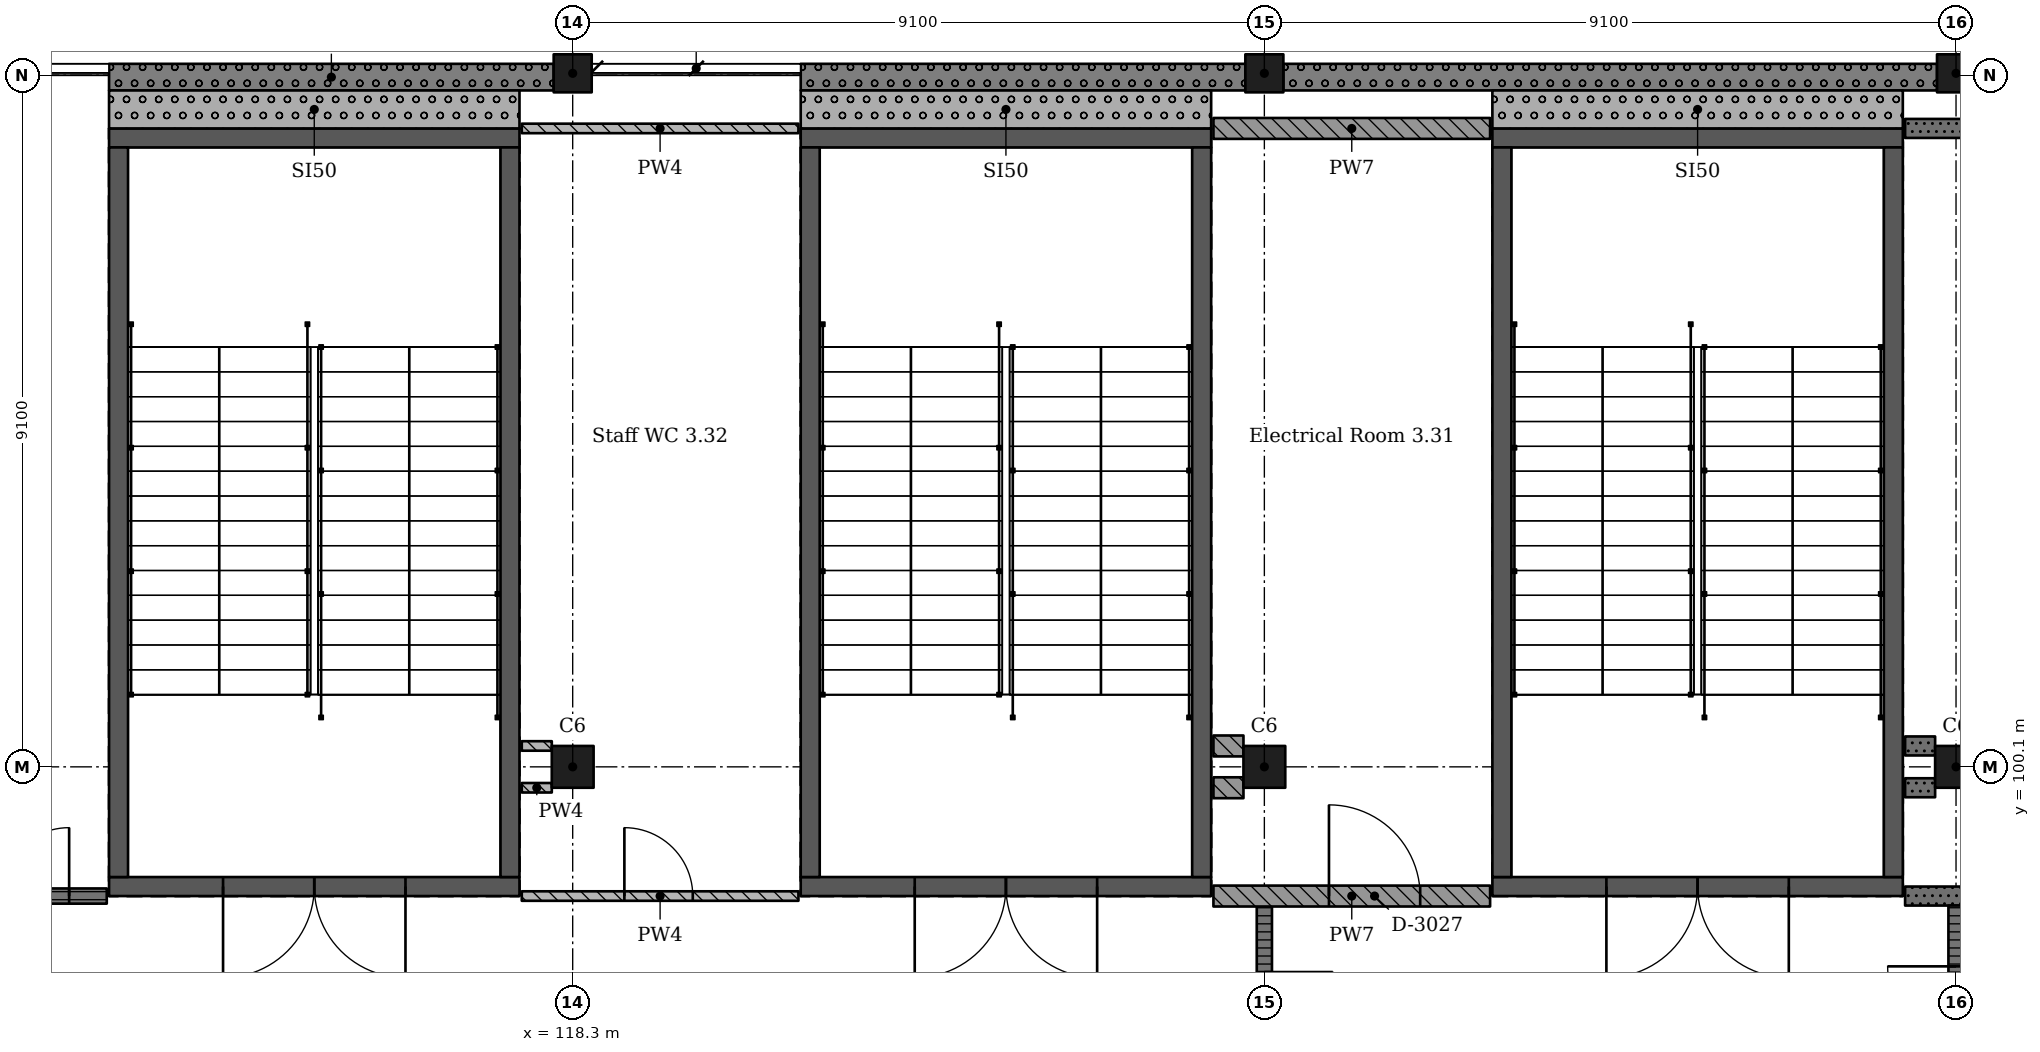
"""IFC4 building model, lengths in metres.
Left out: names, types, materials, properties, quantities, classifications, styles, units other than length and angle.
Written with IfcOpenShell. Run it as: python <this file> out.ifc"""

import sys

from ifc_helpers import new_model, si_unit, direction, frame, frame_2d, origin, origin_2d, place, context, subcontext, project, spatial, rectangle, extrude, element, fill, save


model = new_model("IFC4")
c1 = context("Model", 3, precision=1e-05, world=origin(), true_north=direction((0.0, 1.0)))
c2 = subcontext(c1, "Body", "Model", "MODEL_VIEW")
j1 = project(units=[si_unit("LENGTHUNIT", "METRE"), si_unit("PLANEANGLEUNIT", "RADIAN")], contexts=[c1])
p1 = place(None, origin())
s1 = spatial("IfcSite", under=j1, at=p1, CompositionType="ELEMENT")
p2 = place(p1, origin())
s2 = spatial("IfcBuilding", under=s1, at=p2, CompositionType="ELEMENT")
p3 = place(p2, frame((0.0, 0.0, 15.47)))
s3 = spatial("IfcBuildingStorey", under=s2, at=p3, CompositionType="ELEMENT", Elevation=15.47)
p4 = place(p3, frame((118.3, 100.1, 0.0), z_axis=(0.0, 0.0, 1.0), x_axis=(1.0, 0.0, 0.0)))
e1 = element("IfcColumn", 1, at=p4, inside=s3, PredefinedType="COLUMN", context=c2, shape_type="SweptSolid", body=[
    extrude(rectangle(XDim=0.55, YDim=0.55, at=origin_2d()), origin(), (0.0, 0.0, 1.0), 4.55),
])
p5 = place(p3, frame((118.3, 109.225, 0.0), z_axis=(0.0, 0.0, 1.0), x_axis=(1.0, 0.0, 0.0)))
e2 = element("IfcColumn", 2, at=p5, inside=s3, PredefinedType="COLUMN", context=c2, shape_type="SweptSolid", body=[
    extrude(rectangle(XDim=0.5, YDim=0.5, at=origin_2d()), origin(), (0.0, 0.0, 1.0), 4.55),
])
p6 = place(p3, frame((127.4, 100.1, 0.0), z_axis=(0.0, 0.0, 1.0), x_axis=(1.0, 0.0, 0.0)))
e3 = element("IfcColumn", 3, at=p6, inside=s3, PredefinedType="COLUMN", context=c2, shape_type="SweptSolid", body=[
    extrude(rectangle(XDim=0.55, YDim=0.55, at=origin_2d()), origin(), (0.0, 0.0, 1.0), 4.55),
])
p7 = place(p3, frame((127.4, 109.225, 0.0), z_axis=(0.0, 0.0, 1.0), x_axis=(1.0, 0.0, 0.0)))
e4 = element("IfcColumn", 4, at=p7, inside=s3, PredefinedType="COLUMN", context=c2, shape_type="SweptSolid", body=[
    extrude(rectangle(XDim=0.5, YDim=0.5, at=origin_2d()), origin(), (0.0, 0.0, 1.0), 4.55),
])
p8 = place(p3, frame((136.5, 100.1, 0.0), z_axis=(0.0, 0.0, 1.0), x_axis=(1.0, 0.0, 0.0)))
e5 = element("IfcColumn", 5, at=p8, inside=s3, PredefinedType="COLUMN", context=c2, shape_type="SweptSolid", body=[
    extrude(rectangle(XDim=0.55, YDim=0.55, at=origin_2d()), origin(), (0.0, 0.0, 1.0), 4.55),
])
p9 = place(p3, frame((136.5, 109.225, 0.0), z_axis=(0.0, 0.0, 1.0), x_axis=(1.0, 0.0, 0.0)))
e6 = element("IfcColumn", 6, at=p9, inside=s3, PredefinedType="COLUMN", context=c2, shape_type="SweptSolid", body=[
    extrude(rectangle(XDim=0.5, YDim=0.5, at=origin_2d()), origin(), (0.0, 0.0, 1.0), 4.55),
])
p10 = place(p3, frame((135.8, 98.525, 0.0), z_axis=(0.0, 0.0, 1.0), x_axis=(-1.0, 0.0, 0.0)))
e7 = element("IfcWall", 7, at=p10, inside=s3, PredefinedType="SHEAR", context=c2, shape_type="SweptSolid", body=[
    extrude(rectangle(XDim=5.4, YDim=0.25, at=frame_2d((2.7, 0.0))), origin(), (0.0, 0.0, 1.0), 4.55),
])
p11 = place(p10, frame((1.5, 0.0, 0.0)))
e8 = element("IfcOpeningElement", 8, at=p11, cuts=e7, PredefinedType="OPENING", context=c2, shape_type="SweptSolid", body=[
    extrude(rectangle(XDim=2.4, YDim=2.1, at=frame_2d((1.2, 1.05))), frame((0.0, 0.135, 0.0), z_axis=(0.0, -1.0, 0.0), x_axis=(1.0, 0.0, 0.0)), (0.0, 0.0, 1.0), 0.27),
])
p12 = place(p3, frame((135.8, 108.375, 0.0), z_axis=(0.0, 0.0, 1.0), x_axis=(-1.0, 0.0, 0.0)))
e9 = element("IfcWall", 9, at=p12, inside=s3, PredefinedType="SHEAR", context=c2, shape_type="SweptSolid", body=[
    extrude(rectangle(XDim=5.4, YDim=0.25, at=frame_2d((2.7, 0.0))), origin(), (0.0, 0.0, 1.0), 4.55),
])
for number, where, z_axis, x_axis in (
    (10, (130.525, 108.25, 0.0), (0.0, 0.0, 1.0), (0.0, -1.0, 0.0)),
    (11, (135.675, 108.25, 0.0), (0.0, 0.0, 1.0), (0.0, -1.0, 0.0)),
):
    element("IfcWall", number, at=place(p3, frame(where, z_axis=z_axis, x_axis=x_axis)), inside=s3, PredefinedType="SHEAR", context=c2, shape_type="SweptSolid", body=[
        extrude(rectangle(XDim=9.6, YDim=0.25, at=frame_2d((4.8, 0.0))), origin(), (0.0, 0.0, 1.0), 4.55),
    ])
p13 = place(p3, frame((126.7, 98.525, 0.0), z_axis=(0.0, 0.0, 1.0), x_axis=(-1.0, 0.0, 0.0)))
e12 = element("IfcWall", 12, at=p13, inside=s3, PredefinedType="SHEAR", context=c2, shape_type="SweptSolid", body=[
    extrude(rectangle(XDim=5.4, YDim=0.25, at=frame_2d((2.7, 0.0))), origin(), (0.0, 0.0, 1.0), 4.55),
])
p14 = place(p13, frame((1.5, 0.0, 0.0)))
e13 = element("IfcOpeningElement", 13, at=p14, cuts=e12, PredefinedType="OPENING", context=c2, shape_type="SweptSolid", body=[
    extrude(rectangle(XDim=2.4, YDim=2.1, at=frame_2d((1.2, 1.05))), frame((0.0, 0.135, 0.0), z_axis=(0.0, -1.0, 0.0), x_axis=(1.0, 0.0, 0.0)), (0.0, 0.0, 1.0), 0.27),
])
p15 = place(p3, frame((126.7, 108.375, 0.0), z_axis=(0.0, 0.0, 1.0), x_axis=(-1.0, 0.0, 0.0)))
e14 = element("IfcWall", 14, at=p15, inside=s3, PredefinedType="SHEAR", context=c2, shape_type="SweptSolid", body=[
    extrude(rectangle(XDim=5.4, YDim=0.25, at=frame_2d((2.7, 0.0))), origin(), (0.0, 0.0, 1.0), 4.55),
])
for number, where, z_axis, x_axis in (
    (15, (121.425, 108.25, 0.0), (0.0, 0.0, 1.0), (0.0, -1.0, 0.0)),
    (16, (126.575, 108.25, 0.0), (0.0, 0.0, 1.0), (0.0, -1.0, 0.0)),
):
    element("IfcWall", number, at=place(p3, frame(where, z_axis=z_axis, x_axis=x_axis)), inside=s3, PredefinedType="SHEAR", context=c2, shape_type="SweptSolid", body=[
        extrude(rectangle(XDim=9.6, YDim=0.25, at=frame_2d((4.8, 0.0))), origin(), (0.0, 0.0, 1.0), 4.55),
    ])
p16 = place(p3, frame((117.6, 98.525, 0.0), z_axis=(0.0, 0.0, 1.0), x_axis=(-1.0, 0.0, 0.0)))
e17 = element("IfcWall", 17, at=p16, inside=s3, PredefinedType="SHEAR", context=c2, shape_type="SweptSolid", body=[
    extrude(rectangle(XDim=5.4, YDim=0.25, at=frame_2d((2.7, 0.0))), origin(), (0.0, 0.0, 1.0), 4.55),
])
p17 = place(p16, frame((1.5, 0.0, 0.0)))
e18 = element("IfcOpeningElement", 18, at=p17, cuts=e17, PredefinedType="OPENING", context=c2, shape_type="SweptSolid", body=[
    extrude(rectangle(XDim=2.4, YDim=2.1, at=frame_2d((1.2, 1.05))), frame((0.0, 0.135, 0.0), z_axis=(0.0, -1.0, 0.0), x_axis=(1.0, 0.0, 0.0)), (0.0, 0.0, 1.0), 0.27),
])
p18 = place(p3, frame((117.6, 108.375, 0.0), z_axis=(0.0, 0.0, 1.0), x_axis=(-1.0, 0.0, 0.0)))
e19 = element("IfcWall", 19, at=p18, inside=s3, PredefinedType="SHEAR", context=c2, shape_type="SweptSolid", body=[
    extrude(rectangle(XDim=5.4, YDim=0.25, at=frame_2d((2.7, 0.0))), origin(), (0.0, 0.0, 1.0), 4.55),
])
for number, where, z_axis, x_axis in (
    (20, (112.325, 108.25, 0.0), (0.0, 0.0, 1.0), (0.0, -1.0, 0.0)),
    (21, (117.475, 108.25, 0.0), (0.0, 0.0, 1.0), (0.0, -1.0, 0.0)),
):
    element("IfcWall", number, at=place(p3, frame(where, z_axis=z_axis, x_axis=x_axis)), inside=s3, PredefinedType="SHEAR", context=c2, shape_type="SweptSolid", body=[
        extrude(rectangle(XDim=9.6, YDim=0.25, at=frame_2d((4.8, 0.0))), origin(), (0.0, 0.0, 1.0), 4.55),
    ])
p19 = place(p3, frame((136.25, 109.175, 0.0), z_axis=(0.0, 0.0, 1.0), x_axis=(-1.0, 0.0, 0.0)))
e22 = element("IfcWall", 22, at=p19, inside=s3, PredefinedType="SOLIDWALL", context=c2, shape_type="SweptSolid", body=[
    extrude(rectangle(XDim=8.6, YDim=0.35, at=frame_2d((4.3, 0.0))), origin(), (0.0, 0.0, 1.0), 3.55),
])
p20 = place(p3, frame((127.15, 109.175, 0.0), z_axis=(0.0, 0.0, 1.0), x_axis=(-1.0, 0.0, 0.0)))
e23 = element("IfcWall", 23, at=p20, inside=s3, PredefinedType="SOLIDWALL", context=c2, shape_type="SweptSolid", body=[
    extrude(rectangle(XDim=5.85, YDim=0.35, at=frame_2d((2.925, 0.0))), origin(), (0.0, 0.0, 1.0), 3.55),
])
p21 = place(p3, frame((118.05, 109.175, 0.0), z_axis=(0.0, 0.0, 1.0), x_axis=(-1.0, 0.0, 0.0)))
e24 = element("IfcWall", 24, at=p21, inside=s3, PredefinedType="SOLIDWALL", context=c2, shape_type="SweptSolid", body=[
    extrude(rectangle(XDim=5.85, YDim=0.35, at=frame_2d((2.925, 0.0))), origin(), (0.0, 0.0, 1.0), 3.55),
])
p22 = place(p3, frame((130.4, 108.75, 0.0), z_axis=(0.0, 0.0, 1.0), x_axis=(1.0, 0.0, 0.0)))
e25 = element("IfcWall", 25, at=p22, inside=s3, PredefinedType="SOLIDWALL", context=c2, shape_type="SweptSolid", body=[
    extrude(rectangle(XDim=5.4, YDim=0.5, at=frame_2d((2.7, 0.0))), origin(), (0.0, 0.0, 1.0), 4.3),
])
p23 = place(p3, frame((121.3, 108.75, 0.0), z_axis=(0.0, 0.0, 1.0), x_axis=(1.0, 0.0, 0.0)))
e26 = element("IfcWall", 26, at=p23, inside=s3, PredefinedType="SOLIDWALL", context=c2, shape_type="SweptSolid", body=[
    extrude(rectangle(XDim=5.4, YDim=0.5, at=frame_2d((2.7, 0.0))), origin(), (0.0, 0.0, 1.0), 4.3),
])
p24 = place(p3, frame((112.2, 108.75, 0.0), z_axis=(0.0, 0.0, 1.0), x_axis=(1.0, 0.0, 0.0)))
e27 = element("IfcWall", 27, at=p24, inside=s3, PredefinedType="SOLIDWALL", context=c2, shape_type="SweptSolid", body=[
    extrude(rectangle(XDim=5.4, YDim=0.5, at=frame_2d((2.7, 0.0))), origin(), (0.0, 0.0, 1.0), 4.3),
])
p25 = place(p3, frame((109.425, 98.4, 0.0), z_axis=(0.0, 0.0, 1.0), x_axis=(1.0, 0.0, 0.0)))
e28 = element("IfcWall", 28, at=p25, inside=s3, PredefinedType="PARTITIONING", context=c2, shape_type="SweptSolid", body=[
    extrude(rectangle(XDim=2.745, YDim=0.2, at=frame_2d((1.373, 0.0))), origin(), (0.0, 0.0, 1.0), 4.3),
])
p26 = place(p25, frame((0.45, 0.0, 0.0)))
e29 = element("IfcOpeningElement", 29, at=p26, cuts=e28, PredefinedType="OPENING", context=c2, shape_type="SweptSolid", body=[
    extrude(rectangle(XDim=1.8, YDim=2.4, at=frame_2d((0.9, 1.2))), frame((0.0, 0.11, 0.0), z_axis=(0.0, -1.0, 0.0), x_axis=(1.0, 0.0, 0.0)), (0.0, 0.0, 1.0), 0.22),
])
p27 = place(p3, frame((117.63, 98.4, 0.0), z_axis=(0.0, 0.0, 1.0), x_axis=(1.0, 0.0, 0.0)))
e30 = element("IfcWall", 30, at=p27, inside=s3, PredefinedType="PARTITIONING", context=c2, shape_type="SweptSolid", body=[
    extrude(rectangle(XDim=3.64, YDim=0.125, at=frame_2d((1.82, 0.0))), origin(), (0.0, 0.0, 1.0), 4.3),
])
p28 = place(p27, frame((1.35, 0.0, 0.0)))
e31 = element("IfcOpeningElement", 31, at=p28, cuts=e30, PredefinedType="OPENING", context=c2, shape_type="SweptSolid", body=[
    extrude(rectangle(XDim=0.9, YDim=2.1, at=frame_2d((0.45, 1.05))), frame((0.0, 0.073, 0.0), z_axis=(0.0, -1.0, 0.0), x_axis=(1.0, 0.0, 0.0)), (0.0, 0.0, 1.0), 0.145),
])
p29 = place(p3, frame((117.63, 99.825, 0.0), z_axis=(0.0, 0.0, 1.0), x_axis=(1.0, 0.0, 0.0)))
e32 = element("IfcWall", 32, at=p29, inside=s3, PredefinedType="PARTITIONING", context=c2, shape_type="SweptSolid", body=[
    extrude(rectangle(XDim=0.395, YDim=0.125, at=frame_2d((0.198, 0.0))), origin(), (0.0, 0.0, 1.0), 4.3),
])
p30 = place(p3, frame((117.63, 108.5, 0.0), z_axis=(0.0, 0.0, 1.0), x_axis=(1.0, 0.0, 0.0)))
e33 = element("IfcWall", 33, at=p30, inside=s3, PredefinedType="PARTITIONING", context=c2, shape_type="SweptSolid", body=[
    extrude(rectangle(XDim=3.64, YDim=0.125, at=frame_2d((1.82, 0.0))), origin(), (0.0, 0.0, 1.0), 4.3),
])
p31 = place(p3, frame((118.025, 100.375, 0.0), z_axis=(0.0, 0.0, 1.0), x_axis=(-1.0, 0.0, 0.0)))
e34 = element("IfcWall", 34, at=p31, inside=s3, PredefinedType="PARTITIONING", context=c2, shape_type="SweptSolid", body=[
    extrude(rectangle(XDim=0.395, YDim=0.125, at=frame_2d((0.198, 0.0))), origin(), (0.0, 0.0, 1.0), 4.3),
])
p32 = place(p3, frame((126.73, 98.4, 0.0), z_axis=(0.0, 0.0, 1.0), x_axis=(1.0, 0.0, 0.0)))
e35 = element("IfcWall", 35, at=p32, inside=s3, PredefinedType="SOLIDWALL", context=c2, shape_type="SweptSolid", body=[
    extrude(rectangle(XDim=3.64, YDim=0.275, at=frame_2d((1.82, 0.0))), origin(), (0.0, 0.0, 1.0), 4.3),
])
p33 = place(p32, frame((1.52, 0.0, 0.0)))
e36 = element("IfcOpeningElement", 36, at=p33, cuts=e35, PredefinedType="OPENING", context=c2, shape_type="SweptSolid", body=[
    extrude(rectangle(XDim=1.2, YDim=2.4, at=frame_2d((0.6, 1.2))), frame((0.0, 0.147, 0.0), z_axis=(0.0, -1.0, 0.0), x_axis=(1.0, 0.0, 0.0)), (0.0, 0.0, 1.0), 0.295),
])
p34 = place(p3, frame((126.73, 99.825, 0.0), z_axis=(0.0, 0.0, 1.0), x_axis=(1.0, 0.0, 0.0)))
e37 = element("IfcWall", 37, at=p34, inside=s3, PredefinedType="SOLIDWALL", context=c2, shape_type="SweptSolid", body=[
    extrude(rectangle(XDim=0.395, YDim=0.275, at=frame_2d((0.198, 0.0))), origin(), (0.0, 0.0, 1.0), 4.3),
])
p35 = place(p3, frame((126.73, 108.5, 0.0), z_axis=(0.0, 0.0, 1.0), x_axis=(1.0, 0.0, 0.0)))
e38 = element("IfcWall", 38, at=p35, inside=s3, PredefinedType="SOLIDWALL", context=c2, shape_type="SweptSolid", body=[
    extrude(rectangle(XDim=3.64, YDim=0.275, at=frame_2d((1.82, 0.0))), origin(), (0.0, 0.0, 1.0), 4.3),
])
p36 = place(p3, frame((127.125, 100.375, 0.0), z_axis=(0.0, 0.0, 1.0), x_axis=(-1.0, 0.0, 0.0)))
e39 = element("IfcWall", 39, at=p36, inside=s3, PredefinedType="SOLIDWALL", context=c2, shape_type="SweptSolid", body=[
    extrude(rectangle(XDim=0.395, YDim=0.275, at=frame_2d((0.198, 0.0))), origin(), (0.0, 0.0, 1.0), 4.3),
])
p37 = place(p3, frame((127.4, 91.35, 0.0), z_axis=(0.0, 0.0, 1.0), x_axis=(0.0, 1.0, 0.0)))
e40 = element("IfcWall", 40, at=p37, inside=s3, PredefinedType="PARTITIONING", context=c2, shape_type="SweptSolid", body=[
    extrude(rectangle(XDim=6.912, YDim=0.2, at=frame_2d((3.456, 0.0))), origin(), (0.0, 0.0, 1.0), 3.55),
])
p38 = place(p37, frame((0.85, 0.0, 0.0)))
e41 = element("IfcOpeningElement", 41, at=p38, cuts=e40, PredefinedType="OPENING", context=c2, shape_type="SweptSolid", body=[
    extrude(rectangle(XDim=1.8, YDim=2.4, at=frame_2d((0.9, 1.2))), frame((0.0, 0.11, 0.0), z_axis=(0.0, -1.0, 0.0), x_axis=(1.0, 0.0, 0.0)), (0.0, 0.0, 1.0), 0.22),
])
p39 = place(p37, frame((4.25, 0.0, 0.0)))
e42 = element("IfcOpeningElement", 42, at=p39, cuts=e40, PredefinedType="OPENING", context=c2, shape_type="SweptSolid", body=[
    extrude(rectangle(XDim=1.8, YDim=2.4, at=frame_2d((0.9, 1.2))), frame((0.0, 0.11, 0.0), z_axis=(0.0, -1.0, 0.0), x_axis=(1.0, 0.0, 0.0)), (0.0, 0.0, 1.0), 0.22),
])
p40 = place(p3, frame((135.83, 98.4, 0.0), z_axis=(0.0, 0.0, 1.0), x_axis=(1.0, 0.0, 0.0)))
e43 = element("IfcWall", 43, at=p40, inside=s3, PredefinedType="SOLIDWALL", context=c2, shape_type="SweptSolid", body=[
    extrude(rectangle(XDim=3.64, YDim=0.25, at=frame_2d((1.82, 0.0))), origin(), (0.0, 0.0, 1.0), 4.3),
])
p41 = place(p40, frame((1.62, 0.0, 0.0)))
e44 = element("IfcOpeningElement", 44, at=p41, cuts=e43, PredefinedType="OPENING", context=c2, shape_type="SweptSolid", body=[
    extrude(rectangle(XDim=1.0, YDim=2.1, at=frame_2d((0.5, 1.05))), frame((0.0, 0.135, 0.0), z_axis=(0.0, -1.0, 0.0), x_axis=(1.0, 0.0, 0.0)), (0.0, 0.0, 1.0), 0.27),
])
p42 = place(p3, frame((135.83, 99.825, 0.0), z_axis=(0.0, 0.0, 1.0), x_axis=(1.0, 0.0, 0.0)))
e45 = element("IfcWall", 45, at=p42, inside=s3, PredefinedType="SOLIDWALL", context=c2, shape_type="SweptSolid", body=[
    extrude(rectangle(XDim=0.395, YDim=0.25, at=frame_2d((0.198, 0.0))), origin(), (0.0, 0.0, 1.0), 4.3),
])
p43 = place(p3, frame((135.83, 108.5, 0.0), z_axis=(0.0, 0.0, 1.0), x_axis=(1.0, 0.0, 0.0)))
e46 = element("IfcWall", 46, at=p43, inside=s3, PredefinedType="SOLIDWALL", context=c2, shape_type="SweptSolid", body=[
    extrude(rectangle(XDim=3.64, YDim=0.25, at=frame_2d((1.82, 0.0))), origin(), (0.0, 0.0, 1.0), 4.3),
])
p44 = place(p3, frame((136.225, 100.375, 0.0), z_axis=(0.0, 0.0, 1.0), x_axis=(-1.0, 0.0, 0.0)))
e47 = element("IfcWall", 47, at=p44, inside=s3, PredefinedType="SOLIDWALL", context=c2, shape_type="SweptSolid", body=[
    extrude(rectangle(XDim=0.395, YDim=0.25, at=frame_2d((0.198, 0.0))), origin(), (0.0, 0.0, 1.0), 4.3),
])
p45 = place(p3, frame((136.5, 91.325, 0.0), z_axis=(0.0, 0.0, 1.0), x_axis=(0.0, 1.0, 0.0)))
e48 = element("IfcWall", 48, at=p45, inside=s3, PredefinedType="PARTITIONING", context=c2, shape_type="SweptSolid", body=[
    extrude(rectangle(XDim=6.95, YDim=0.2, at=frame_2d((3.475, 0.0))), origin(), (0.0, 0.0, 1.0), 3.55),
])
p46 = place(p45, frame((0.85, 0.0, 0.0)))
e49 = element("IfcOpeningElement", 49, at=p46, cuts=e48, PredefinedType="OPENING", context=c2, shape_type="SweptSolid", body=[
    extrude(rectangle(XDim=1.8, YDim=2.4, at=frame_2d((0.9, 1.2))), frame((0.0, 0.11, 0.0), z_axis=(0.0, -1.0, 0.0), x_axis=(1.0, 0.0, 0.0)), (0.0, 0.0, 1.0), 0.22),
])
p47 = place(p45, frame((4.35, 0.0, 0.0)))
e50 = element("IfcOpeningElement", 50, at=p47, cuts=e48, PredefinedType="OPENING", context=c2, shape_type="SweptSolid", body=[
    extrude(rectangle(XDim=1.8, YDim=2.4, at=frame_2d((0.9, 1.2))), frame((0.0, 0.11, 0.0), z_axis=(0.0, -1.0, 0.0), x_axis=(1.0, 0.0, 0.0)), (0.0, 0.0, 1.0), 0.22),
])
p48 = place(p33, origin())
e51 = element("IfcDoor", 51, at=p48, inside=s3, OperationType="SINGLE_SWING_RIGHT", PredefinedType="DOOR", context=c2, shape_type="SweptSolid", body=[
    extrude(rectangle(XDim=1.2, YDim=2.4, at=frame_2d((0.6, 1.2))), frame((0.0, 0.025, 0.0), z_axis=(0.0, -1.0, 0.0), x_axis=(1.0, 0.0, 0.0)), (0.0, 0.0, 1.0), 0.05),
])
fill(e36, e51)
p49 = place(p28, origin())
e52 = element("IfcDoor", 52, at=p49, inside=s3, OperationType="SINGLE_SWING_RIGHT", PredefinedType="DOOR", context=c2, shape_type="SweptSolid", body=[
    extrude(rectangle(XDim=0.9, YDim=2.1, at=frame_2d((0.45, 1.05))), frame((0.0, 0.025, 0.0), z_axis=(0.0, -1.0, 0.0), x_axis=(1.0, 0.0, 0.0)), (0.0, 0.0, 1.0), 0.05),
])
fill(e31, e52)
p50 = place(p47, origin())
e53 = element("IfcDoor", 53, at=p50, inside=s3, OperationType="DOUBLE_DOOR_SINGLE_SWING", PredefinedType="DOOR", context=c2, shape_type="SweptSolid", body=[
    extrude(rectangle(XDim=1.8, YDim=2.4, at=frame_2d((0.9, 1.2))), frame((0.0, 0.025, 0.0), z_axis=(0.0, -1.0, 0.0), x_axis=(1.0, 0.0, 0.0)), (0.0, 0.0, 1.0), 0.05),
])
fill(e50, e53)
p51 = place(p39, origin())
e54 = element("IfcDoor", 54, at=p51, inside=s3, OperationType="DOUBLE_DOOR_SINGLE_SWING", PredefinedType="DOOR", context=c2, shape_type="SweptSolid", body=[
    extrude(rectangle(XDim=1.8, YDim=2.4, at=frame_2d((0.9, 1.2))), frame((0.0, 0.025, 0.0), z_axis=(0.0, -1.0, 0.0), x_axis=(1.0, 0.0, 0.0)), (0.0, 0.0, 1.0), 0.05),
])
fill(e42, e54)
p52 = place(p26, origin())
e55 = element("IfcDoor", 55, at=p52, inside=s3, OperationType="DOUBLE_DOOR_SINGLE_SWING", PredefinedType="DOOR", context=c2, shape_type="SweptSolid", body=[
    extrude(rectangle(XDim=1.8, YDim=2.4, at=frame_2d((0.9, 1.2))), frame((0.0, 0.025, 0.0), z_axis=(0.0, -1.0, 0.0), x_axis=(1.0, 0.0, 0.0)), (0.0, 0.0, 1.0), 0.05),
])
fill(e29, e55)
p53 = place(p11, origin())
e56 = element("IfcDoor", 56, at=p53, inside=s3, OperationType="DOUBLE_DOOR_SINGLE_SWING", PredefinedType="DOOR", context=c2, shape_type="SweptSolid", body=[
    extrude(rectangle(XDim=2.4, YDim=2.1, at=frame_2d((1.2, 1.05))), frame((0.0, 0.025, 0.0), z_axis=(0.0, -1.0, 0.0), x_axis=(1.0, 0.0, 0.0)), (0.0, 0.0, 1.0), 0.05),
])
fill(e8, e56)
p54 = place(p14, origin())
e57 = element("IfcDoor", 57, at=p54, inside=s3, OperationType="DOUBLE_DOOR_SINGLE_SWING", PredefinedType="DOOR", context=c2, shape_type="SweptSolid", body=[
    extrude(rectangle(XDim=2.4, YDim=2.1, at=frame_2d((1.2, 1.05))), frame((0.0, 0.025, 0.0), z_axis=(0.0, -1.0, 0.0), x_axis=(1.0, 0.0, 0.0)), (0.0, 0.0, 1.0), 0.05),
])
fill(e13, e57)
p55 = place(p17, origin())
e58 = element("IfcDoor", 58, at=p55, inside=s3, OperationType="DOUBLE_DOOR_SINGLE_SWING", PredefinedType="DOOR", context=c2, shape_type="SweptSolid", body=[
    extrude(rectangle(XDim=2.4, YDim=2.1, at=frame_2d((1.2, 1.05))), frame((0.0, 0.025, 0.0), z_axis=(0.0, -1.0, 0.0), x_axis=(1.0, 0.0, 0.0)), (0.0, 0.0, 1.0), 0.05),
])
fill(e18, e58)
save(model, sys.argv[1])
